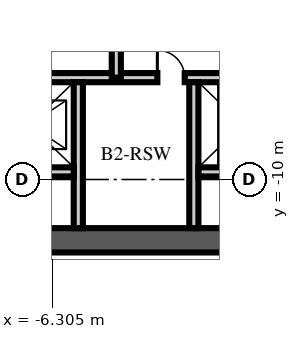
"""IFC4 building model, lengths in metres.
Left out: names, types, materials, properties, quantities, classifications, styles, units other than length and angle.
Written with IfcOpenShell. Run it as: python <this file> out.ifc"""

import sys

from ifc_helpers import new_model, si_unit, direction, frame, frame_2d, origin, place, context, subcontext, project, spatial, rectangle, extrude, element, fill, save


model = new_model("IFC4")
c1 = context("Model", 3, precision=1e-05, world=origin(), true_north=direction((0.0, 1.0)))
c2 = subcontext(c1, "Body", "Model", "MODEL_VIEW")
j1 = project(units=[si_unit("LENGTHUNIT", "METRE"), si_unit("PLANEANGLEUNIT", "RADIAN")], contexts=[c1])
p1 = place(None, origin())
s1 = spatial("IfcSite", under=j1, at=p1, CompositionType="ELEMENT")
p2 = place(p1, origin())
s2 = spatial("IfcBuilding", under=s1, at=p2, CompositionType="ELEMENT")
p3 = place(p2, frame((0.0, 0.0, -9.0)))
s3 = spatial("IfcBuildingStorey", under=s2, at=p3, CompositionType="ELEMENT", Elevation=-9.0)
p4 = place(p3, frame((-15.5, -12.0, -0.3), z_axis=(0.0, 0.0, 1.0), x_axis=(1.0, 0.0, 0.0)))
e1 = element("IfcWall", 1, at=p4, inside=s3, PredefinedType="SHEAR", context=c2, shape_type="SweptSolid", body=[
    extrude(rectangle(XDim=31.0, YDim=0.8, at=frame_2d((15.5, 0.0))), origin(), (0.0, 0.0, 1.0), 3.6),
])
p5 = place(p3, frame((-8.5, -6.65, 0.0), z_axis=(0.0, 0.0, 1.0), x_axis=(1.0, 0.0, 0.0)))
e2 = element("IfcWall", 2, at=p5, inside=s3, PredefinedType="PARTITIONING", context=c2, shape_type="SweptSolid", body=[
    extrude(rectangle(XDim=17.0, YDim=0.3, at=frame_2d((8.5, 0.0))), origin(), (0.0, 0.0, 1.0), 3.3),
])
p6 = place(p5, frame((7.8, 0.0, 0.0)))
e3 = element("IfcOpeningElement", 3, at=p6, cuts=e2, PredefinedType="OPENING", context=c2, shape_type="SweptSolid", body=[
    extrude(rectangle(XDim=1.3, YDim=2.4, at=frame_2d((0.65, 1.2))), frame((0.0, 0.16, 0.0), z_axis=(0.0, -1.0, 0.0), x_axis=(1.0, 0.0, 0.0)), (0.0, 0.0, 1.0), 0.32),
])
p7 = place(p5, frame((5.65, 0.0, 0.0)))
e4 = element("IfcOpeningElement", 4, at=p7, cuts=e2, PredefinedType="OPENING", context=c2, shape_type="SweptSolid", body=[
    extrude(rectangle(XDim=0.9, YDim=2.1, at=frame_2d((0.45, 1.05))), frame((0.0, 0.16, 0.0), z_axis=(0.0, -1.0, 0.0), x_axis=(1.0, 0.0, 0.0)), (0.0, 0.0, 1.0), 0.32),
])
p8 = place(p5, frame((10.4, 0.0, 0.0)))
e5 = element("IfcOpeningElement", 5, at=p8, cuts=e2, PredefinedType="OPENING", context=c2, shape_type="SweptSolid", body=[
    extrude(rectangle(XDim=0.9, YDim=2.1, at=frame_2d((0.45, 1.05))), frame((0.0, 0.16, 0.0), z_axis=(0.0, -1.0, 0.0), x_axis=(1.0, 0.0, 0.0)), (0.0, 0.0, 1.0), 0.32),
])
for number, where, z_axis, x_axis in (
    (6, (-5.45, -11.6, 0.0), (0.0, 0.0, 1.0), (0.0, 1.0, 0.0)),
    (7, (-1.65, -11.6, 0.0), (0.0, 0.0, 1.0), (0.0, 1.0, 0.0)),
):
    element("IfcWall", number, at=place(p3, frame(where, z_axis=z_axis, x_axis=x_axis)), inside=s3, PredefinedType="PARTITIONING", context=c2, shape_type="SweptSolid", body=[
        extrude(rectangle(XDim=4.8, YDim=0.3, at=frame_2d((2.4, 0.0))), origin(), (0.0, 0.0, 1.0), 3.3),
    ])
for number, where, z_axis, x_axis in (
    (8, (-8.5, -9.75, 0.0), (0.0, 0.0, 1.0), (1.0, 0.0, 0.0)),
    (9, (-1.5, -9.75, 0.0), (0.0, 0.0, 1.0), (1.0, 0.0, 0.0)),
):
    element("IfcWall", number, at=place(p3, frame(where, z_axis=z_axis, x_axis=x_axis)), inside=s3, PredefinedType="PARTITIONING", context=c2, shape_type="SweptSolid", body=[
        extrude(rectangle(XDim=2.9, YDim=0.3, at=frame_2d((1.45, 0.0))), origin(), (0.0, 0.0, 1.0), 3.3),
    ])
p9 = place(p3, frame((-4.2, -6.65, 0.0), z_axis=(0.0, 0.0, 1.0), x_axis=(0.0, 1.0, 0.0)))
e10 = element("IfcWall", 10, at=p9, inside=s3, PredefinedType="PARTITIONING", context=c2, shape_type="SweptSolid", body=[
    extrude(rectangle(XDim=7.45, YDim=0.3, at=frame_2d((3.725, 0.0))), origin(), (0.0, 0.0, 1.0), 3.3),
])
p10 = place(p9, frame((3.275, 0.0, 0.0)))
e11 = element("IfcOpeningElement", 11, at=p10, cuts=e10, PredefinedType="OPENING", context=c2, shape_type="SweptSolid", body=[
    extrude(rectangle(XDim=0.9, YDim=2.1, at=frame_2d((0.45, 1.05))), frame((0.0, 0.16, 0.0), z_axis=(0.0, -1.0, 0.0), x_axis=(1.0, 0.0, 0.0)), (0.0, 0.0, 1.0), 0.32),
])
p11 = place(p7, origin())
e12 = element("IfcDoor", 12, at=p11, inside=s3, OperationType="SINGLE_SWING_LEFT", PredefinedType="DOOR", context=c2, shape_type="SweptSolid", body=[
    extrude(rectangle(XDim=0.9, YDim=2.1, at=frame_2d((0.45, 1.05))), frame((0.0, 0.025, 0.0), z_axis=(0.0, -1.0, 0.0), x_axis=(1.0, 0.0, 0.0)), (0.0, 0.0, 1.0), 0.05),
])
fill(e4, e12)
save(model, sys.argv[1])
